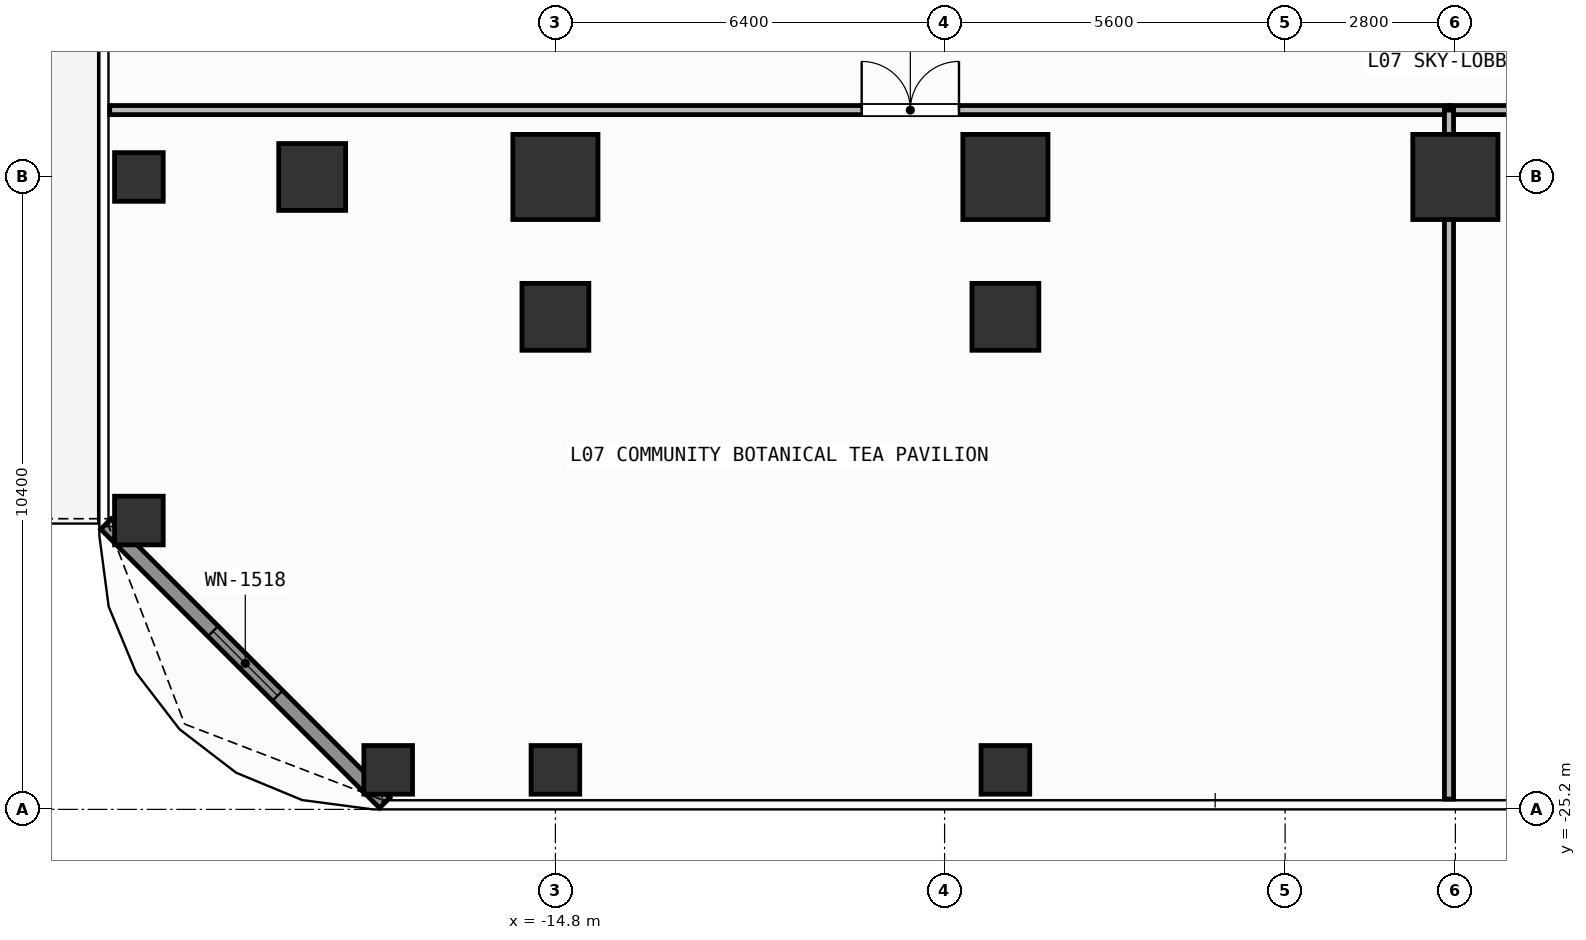
"""IFC4 building model, lengths in metres.
Left out: names, types, materials, properties, quantities, classifications, styles, units other than length and angle.
Written with IfcOpenShell. Run it as: python <this file> out.ifc"""

import sys

from ifc_helpers import new_model, si_unit, direction, frame, frame_2d, origin, origin_2d, place, context, subcontext, project, spatial, rectangle, hollow_rectangle, extrude, element, fill, save


model = new_model("IFC4")
c1 = context("Model", 3, precision=1e-05, world=origin(), true_north=direction((0.0, 1.0)))
c2 = subcontext(c1, "Body", "Model", "MODEL_VIEW")
j1 = project(units=[si_unit("LENGTHUNIT", "METRE"), si_unit("PLANEANGLEUNIT", "RADIAN")], contexts=[c1])
p1 = place(None, origin())
s1 = spatial("IfcSite", under=j1, at=p1, CompositionType="ELEMENT")
p2 = place(p1, origin())
s2 = spatial("IfcBuilding", under=s1, at=p2, CompositionType="ELEMENT")
p3 = place(p2, frame((0.0, 0.0, 26.4)))
s3 = spatial("IfcBuildingStorey", under=s2, at=p3, CompositionType="ELEMENT", Elevation=26.4)
for number, where, z_axis, x_axis in (
    (1, (-14.8, -14.8, 0.0), (0.0, 0.0, 1.0), (1.0, 0.0, 0.0)),
    (2, (-7.4, -14.8, 0.0), (0.0, 0.0, 1.0), (1.0, 0.0, 0.0)),
    (3, (0.0, -14.8, 0.0), (0.0, 0.0, 1.0), (1.0, 0.0, 0.0)),
):
    element("IfcColumn", number, at=place(p3, frame(where, z_axis=z_axis, x_axis=x_axis)), inside=s3, PredefinedType="COLUMN", context=c2, shape_type="SweptSolid", body=[
        extrude(rectangle(XDim=1.4, YDim=1.4, at=origin_2d()), origin(), (0.0, 0.0, 1.0), 4.2),
    ])
for number, where, z_axis, x_axis in (
    (4, (-18.8, -14.8, 0.0), (0.0, 0.0, 1.0), (1.0, 0.0, 0.0)),
    (5, (-14.8, -17.1, 0.0), (0.0, 0.0, 1.0), (1.0, 0.0, 0.0)),
    (6, (-7.4, -17.1, 0.0), (0.0, 0.0, 1.0), (1.0, 0.0, 0.0)),
):
    element("IfcColumn", number, at=place(p3, frame(where, z_axis=z_axis, x_axis=x_axis)), inside=s3, PredefinedType="COLUMN", context=c2, shape_type="SweptSolid", body=[
        extrude(rectangle(XDim=1.1, YDim=1.1, at=origin_2d()), origin(), (0.0, 0.0, 1.0), 4.2),
    ])
for number, where, z_axis, x_axis in (
    (7, (-17.55, -24.55, 0.0), (0.0, 0.0, 1.0), (1.0, 0.0, 0.0)),
    (8, (-21.65, -20.45, 0.0), (0.0, 0.0, 1.0), (1.0, 0.0, 0.0)),
    (9, (-14.8, -24.55, 0.0), (0.0, 0.0, 1.0), (1.0, 0.0, 0.0)),
    (10, (-7.4, -24.55, 0.0), (0.0, 0.0, 1.0), (1.0, 0.0, 0.0)),
    (11, (-21.65, -14.8, 0.0), (0.0, 0.0, 1.0), (1.0, 0.0, 0.0)),
):
    element("IfcColumn", number, at=place(p3, frame(where, z_axis=z_axis, x_axis=x_axis)), inside=s3, PredefinedType="COLUMN", context=c2, shape_type="SweptSolid", body=[
        extrude(hollow_rectangle(XDim=0.8, YDim=0.8, WallThickness=0.036, at=origin_2d()), origin(), (0.0, 0.0, 1.0), 4.2),
    ])
p4 = place(p3, frame((-17.608, -25.092, 0.0), z_axis=(0.0, 0.0, 1.0), x_axis=(-0.707106781187, 0.707106781187, 0.0)))
e12 = element("IfcWall", 12, at=p4, inside=s3, PredefinedType="SOLIDWALL", context=c2, shape_type="SweptSolid", body=[
    extrude(rectangle(XDim=6.484, YDim=0.24, at=frame_2d((3.242, 0.0))), origin(), (0.0, 0.0, 1.0), 3.98),
])
p5 = place(p4, frame((2.492, 0.0, 0.8)))
e13 = element("IfcOpeningElement", 13, at=p5, cuts=e12, PredefinedType="OPENING", context=c2, shape_type="SweptSolid", body=[
    extrude(rectangle(XDim=1.5, YDim=1.85, at=frame_2d((0.75, 0.925))), frame((0.0, 0.13, 0.0), z_axis=(0.0, -1.0, 0.0), x_axis=(1.0, 0.0, 0.0)), (0.0, 0.0, 1.0), 0.26),
])
p6 = place(p3, frame((-22.13, -13.7, 0.0), z_axis=(0.0, 0.0, 1.0), x_axis=(1.0, 0.0, 0.0)))
e14 = element("IfcWall", 14, at=p6, inside=s3, PredefinedType="PARTITIONING", context=c2, shape_type="SweptSolid", body=[
    extrude(rectangle(XDim=22.025, YDim=0.15, at=frame_2d((11.012, 0.0))), origin(), (0.0, 0.0, 1.0), 3.98),
])
p7 = place(p6, frame((12.367, 0.0, 0.0)))
e15 = element("IfcOpeningElement", 15, at=p7, cuts=e14, PredefinedType="OPENING", context=c2, shape_type="SweptSolid", body=[
    extrude(rectangle(XDim=1.6, YDim=2.3, at=frame_2d((0.8, 1.15))), frame((0.0, 0.085, 0.0), z_axis=(0.0, -1.0, 0.0), x_axis=(1.0, 0.0, 0.0)), (0.0, 0.0, 1.0), 0.17),
])
p8 = place(p3, frame((-0.105, -13.7, 0.0), z_axis=(0.0, 0.0, 1.0), x_axis=(1.0, 0.0, 0.0)))
e16 = element("IfcWall", 16, at=p8, inside=s3, PredefinedType="PARTITIONING", context=c2, shape_type="SweptSolid", body=[
    extrude(rectangle(XDim=15.024, YDim=0.15, at=frame_2d((7.512, 0.0))), origin(), (0.0, 0.0, 1.0), 3.98),
])
p9 = place(p8, frame((5.718, 0.0, 0.0)))
e17 = element("IfcOpeningElement", 17, at=p9, cuts=e16, PredefinedType="OPENING", context=c2, shape_type="SweptSolid", body=[
    extrude(rectangle(XDim=0.9, YDim=2.1, at=frame_2d((0.45, 1.05))), frame((0.0, 0.085, 0.0), z_axis=(0.0, -1.0, 0.0), x_axis=(1.0, 0.0, 0.0)), (0.0, 0.0, 1.0), 0.17),
])
p10 = place(p3, frame((-0.105, -25.03, 0.0), z_axis=(0.0, 0.0, 1.0), x_axis=(0.0, 1.0, 0.0)))
e18 = element("IfcWall", 18, at=p10, inside=s3, PredefinedType="PARTITIONING", context=c2, shape_type="SweptSolid", body=[
    extrude(rectangle(XDim=11.33, YDim=0.15, at=frame_2d((5.665, 0.0))), origin(), (0.0, 0.0, 1.0), 3.98),
])
p11 = place(p5, origin())
e19 = element("IfcWindow", 19, at=p11, inside=s3, PartitioningType="SINGLE_PANEL", PredefinedType="WINDOW", context=c2, shape_type="SweptSolid", body=[
    extrude(rectangle(XDim=1.5, YDim=1.85, at=frame_2d((0.75, 0.925))), frame((0.0, 0.03, 0.0), z_axis=(0.0, -1.0, 0.0), x_axis=(1.0, 0.0, 0.0)), (0.0, 0.0, 1.0), 0.06),
])
fill(e13, e19)
p12 = place(p7, origin())
e20 = element("IfcDoor", 20, at=p12, inside=s3, OperationType="SINGLE_SWING_LEFT", PredefinedType="DOOR", context=c2, shape_type="SweptSolid", body=[
    extrude(rectangle(XDim=1.6, YDim=2.3, at=frame_2d((0.8, 1.15))), frame((0.0, 0.025, 0.0), z_axis=(0.0, -1.0, 0.0), x_axis=(1.0, 0.0, 0.0)), (0.0, 0.0, 1.0), 0.05),
])
fill(e15, e20)
save(model, sys.argv[1])
